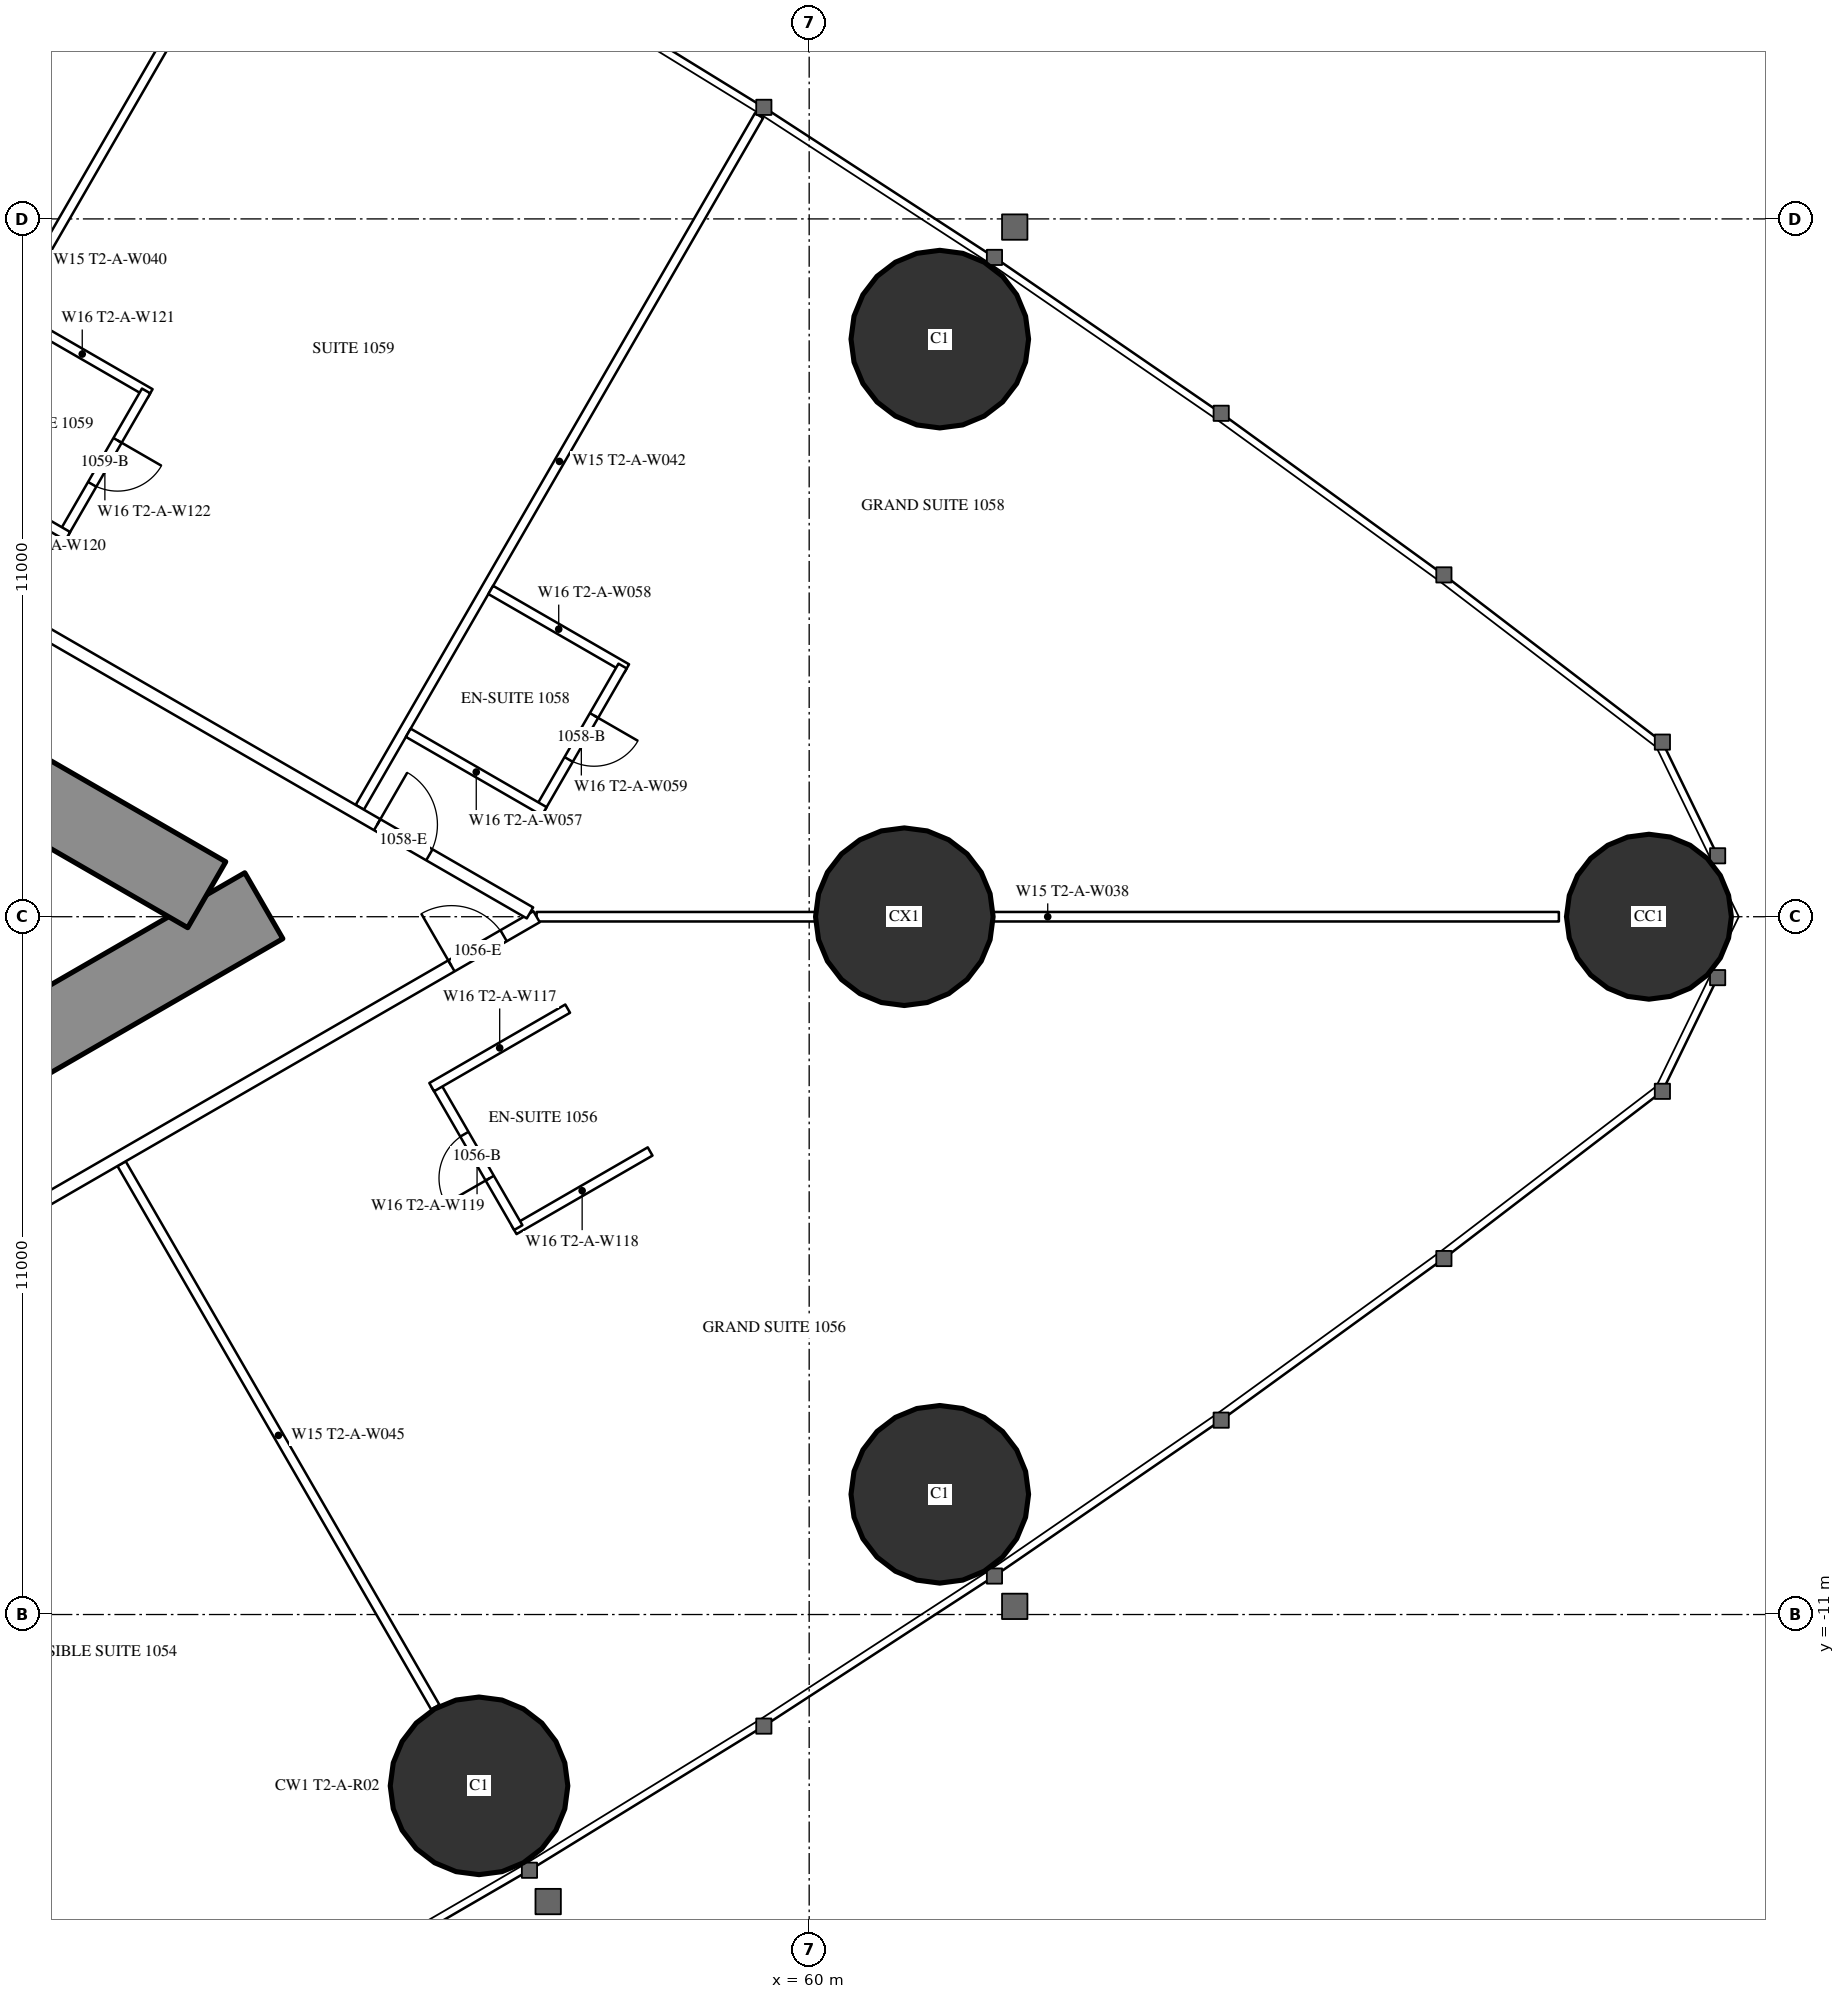
"""IFC4 building model, lengths in metres.
Left out: names, types, materials, properties, quantities, classifications, styles, units other than length and angle.
Written with IfcOpenShell. Run it as: python <this file> out.ifc"""

import sys

from ifc_helpers import new_model, si_unit, direction, frame, frame_2d, origin, origin_2d, place, context, subcontext, project, spatial, rectangle, hollow_circle, extrude, element, fill, save


model = new_model("IFC4")
c1 = context("Model", 3, precision=1e-05, world=origin(), true_north=direction((0.0, 1.0)))
c2 = subcontext(c1, "Body", "Model", "MODEL_VIEW")
j1 = project(units=[si_unit("LENGTHUNIT", "METRE"), si_unit("PLANEANGLEUNIT", "RADIAN")], contexts=[c1])
p1 = place(None, origin())
s1 = spatial("IfcSite", under=j1, at=p1, CompositionType="ELEMENT")
p2 = place(p1, origin())
s2 = spatial("IfcBuilding", under=s1, at=p2, CompositionType="ELEMENT")
p3 = place(p2, frame((0.0, 0.0, 42.5)))
s3 = spatial("IfcBuildingStorey", under=s2, at=p3, CompositionType="ELEMENT", Elevation=42.5)
p4 = place(p3, frame((73.239, 0.0, 0.0), z_axis=(0.0, 0.0, 1.0), x_axis=(1.0, 0.0, 0.0)))
e1 = element("IfcColumn", 1, at=p4, inside=s3, PredefinedType="COLUMN", context=c2, shape_type="SweptSolid", body=[
    extrude(hollow_circle(Radius=1.3, WallThickness=0.1, at=origin_2d()), origin(), (0.0, 0.0, 1.0), 3.5),
])
for number, where, z_axis, x_axis in (
    (2, (62.059, 9.105, 0.0), (0.0, 0.0, 1.0), (1.0, 0.0, 0.0)),
    (3, (54.795, -13.701, 0.0), (0.0, 0.0, 1.0), (1.0, 0.0, 0.0)),
    (4, (62.059, -9.105, 0.0), (0.0, 0.0, 1.0), (1.0, 0.0, 0.0)),
):
    element("IfcColumn", number, at=place(p3, frame(where, z_axis=z_axis, x_axis=x_axis)), inside=s3, PredefinedType="COLUMN", context=c2, shape_type="SweptSolid", body=[
        extrude(hollow_circle(Radius=1.4, WallThickness=0.12, at=origin_2d()), origin(), (0.0, 0.0, 1.0), 3.5),
    ])
p5 = place(p3, frame((61.5, 0.0, 0.0), z_axis=(0.0, 0.0, 1.0), x_axis=(1.0, 0.0, 0.0)))
e5 = element("IfcColumn", 5, at=p5, inside=s3, PredefinedType="COLUMN", context=c2, shape_type="SweptSolid", body=[
    extrude(hollow_circle(Radius=1.4, WallThickness=0.1, at=origin_2d()), origin(), (0.0, 0.0, 1.0), 3.5),
])
p6 = place(p3, frame((27.2, -13.8, 0.0), z_axis=(0.0, 0.0, 1.0), x_axis=(0.866027159892, 0.499996958321, 0.0)))
e6 = element("IfcWall", 6, at=p6, inside=s3, PredefinedType="SHEAR", context=c2, shape_type="SweptSolid", body=[
    extrude(rectangle(XDim=27.947, YDim=1.2, at=frame_2d((13.973, 0.0))), origin(), (0.0, 0.0, 1.0), 3.5),
])
p7 = place(p6, frame((4.6, 0.0, 0.0)))
e7 = element("IfcOpeningElement", 7, at=p7, cuts=e6, PredefinedType="OPENING", context=c2, shape_type="SweptSolid", body=[
    extrude(rectangle(XDim=1.0, YDim=2.2, at=frame_2d((0.5, 1.1))), frame((0.0, 0.61, 0.0), z_axis=(0.0, -1.0, 0.0), x_axis=(1.0, 0.0, 0.0)), (0.0, 0.0, 1.0), 1.22),
])
p8 = place(p6, frame((13.395, 0.0, 0.0)))
e8 = element("IfcOpeningElement", 8, at=p8, cuts=e6, PredefinedType="OPENING", context=c2, shape_type="SweptSolid", body=[
    extrude(rectangle(XDim=1.8, YDim=2.2, at=frame_2d((0.9, 1.1))), frame((0.0, 0.61, 0.0), z_axis=(0.0, -1.0, 0.0), x_axis=(1.0, 0.0, 0.0)), (0.0, 0.0, 1.0), 1.22),
])
p9 = place(p3, frame((27.2, 13.8, 0.0), z_axis=(0.0, 0.0, 1.0), x_axis=(0.866024515034, -0.500001539357, 0.0)))
e9 = element("IfcWall", 9, at=p9, inside=s3, PredefinedType="SHEAR", context=c2, shape_type="SweptSolid", body=[
    extrude(rectangle(XDim=26.907, YDim=1.2, at=frame_2d((13.454, 0.0))), origin(), (0.0, 0.0, 1.0), 3.5),
])
p10 = place(p9, frame((4.6, 0.0, 0.0)))
e10 = element("IfcOpeningElement", 10, at=p10, cuts=e9, PredefinedType="OPENING", context=c2, shape_type="SweptSolid", body=[
    extrude(rectangle(XDim=1.0, YDim=2.2, at=frame_2d((0.5, 1.1))), frame((0.0, 0.61, 0.0), z_axis=(0.0, -1.0, 0.0), x_axis=(1.0, 0.0, 0.0)), (0.0, 0.0, 1.0), 1.22),
])
p11 = place(p9, frame((13.395, 0.0, 0.0)))
e11 = element("IfcOpeningElement", 11, at=p11, cuts=e9, PredefinedType="OPENING", context=c2, shape_type="SweptSolid", body=[
    extrude(rectangle(XDim=1.8, YDim=2.2, at=frame_2d((0.9, 1.1))), frame((0.0, 0.61, 0.0), z_axis=(0.0, -1.0, 0.0), x_axis=(1.0, 0.0, 0.0)), (0.0, 0.0, 1.0), 1.22),
])
p12 = place(p3, frame((49.159, -3.893, 0.0), z_axis=(0.0, 0.0, 1.0), x_axis=(0.499998773722, -0.866026111775, 0.0)))
e12 = element("IfcWall", 12, at=p12, inside=s3, PredefinedType="PARTITIONING", context=c2, shape_type="SweptSolid", body=[
    extrude(rectangle(XDim=9.892, YDim=0.15, at=frame_2d((4.946, 0.0))), origin(), (0.0, 0.0, 1.0), 2.25),
])
p13 = place(p3, frame((45.403, 6.062, 0.0), z_axis=(0.0, 0.0, 1.0), x_axis=(0.500013434677, 0.866017647131, 0.0)))
e13 = element("IfcWall", 13, at=p13, inside=s3, PredefinedType="PARTITIONING", context=c2, shape_type="SweptSolid", body=[
    extrude(rectangle(XDim=9.902, YDim=0.15, at=frame_2d((4.951, 0.0))), origin(), (0.0, 0.0, 1.0), 2.25),
])
p14 = place(p3, frame((52.915, 1.725, 0.0), z_axis=(0.0, 0.0, 1.0), x_axis=(0.499997163113, 0.866027041656, 0.0)))
e14 = element("IfcWall", 14, at=p14, inside=s3, PredefinedType="PARTITIONING", context=c2, shape_type="SweptSolid", body=[
    extrude(rectangle(XDim=12.591, YDim=0.15, at=frame_2d((6.295, 0.0))), origin(), (0.0, 0.0, 1.0), 3.25),
])
p15 = place(p3, frame((55.702, 0.0, 0.0), z_axis=(0.0, 0.0, 1.0), x_axis=(1.0, 0.0, 0.0)))
e15 = element("IfcWall", 15, at=p15, inside=s3, PredefinedType="PARTITIONING", context=c2, shape_type="SweptSolid", body=[
    extrude(rectangle(XDim=16.117, YDim=0.15, at=frame_2d((8.059, 0.0))), origin(), (0.0, 0.0, 1.0), 2.25),
])
p16 = place(p3, frame((37.96, -10.243, 0.0), z_axis=(0.0, 0.0, 1.0), x_axis=(0.866026429433, 0.499998223521, 0.0)))
e16 = element("IfcWall", 16, at=p16, inside=s3, PredefinedType="PARTITIONING", context=c2, shape_type="SweptSolid", body=[
    extrude(rectangle(XDim=20.487, YDim=0.2, at=frame_2d((10.243, 0.0))), origin(), (0.0, 0.0, 1.0), 3.25),
])
p17 = place(p16, frame((7.325, 0.0, 0.0)))
e17 = element("IfcOpeningElement", 17, at=p17, cuts=e16, PredefinedType="OPENING", context=c2, shape_type="SweptSolid", body=[
    extrude(rectangle(XDim=1.0, YDim=2.2, at=frame_2d((0.5, 1.1))), frame((0.0, 0.11, 0.0), z_axis=(0.0, -1.0, 0.0), x_axis=(1.0, 0.0, 0.0)), (0.0, 0.0, 1.0), 0.22),
])
p18 = place(p16, frame((18.937, 0.0, 0.0)))
e18 = element("IfcOpeningElement", 18, at=p18, cuts=e16, PredefinedType="OPENING", context=c2, shape_type="SweptSolid", body=[
    extrude(rectangle(XDim=0.95, YDim=2.2, at=frame_2d((0.475, 1.1))), frame((0.0, 0.11, 0.0), z_axis=(0.0, -1.0, 0.0), x_axis=(1.0, 0.0, 0.0)), (0.0, 0.0, 1.0), 0.22),
])
p19 = place(p16, frame((0.6, 0.0, 0.0)))
e19 = element("IfcOpeningElement", 19, at=p19, cuts=e16, PredefinedType="OPENING", context=c2, shape_type="SweptSolid", body=[
    extrude(rectangle(XDim=0.95, YDim=2.2, at=frame_2d((0.475, 1.1))), frame((0.0, 0.11, 0.0), z_axis=(0.0, -1.0, 0.0), x_axis=(1.0, 0.0, 0.0)), (0.0, 0.0, 1.0), 0.22),
])
p20 = place(p3, frame((36.834, 10.894, 0.0), z_axis=(0.0, 0.0, 1.0), x_axis=(0.866028157229, -0.499995230863, 0.0)))
e20 = element("IfcWall", 20, at=p20, inside=s3, PredefinedType="PARTITIONING", context=c2, shape_type="SweptSolid", body=[
    extrude(rectangle(XDim=21.667, YDim=0.2, at=frame_2d((10.833, 0.0))), origin(), (0.0, 0.0, 1.0), 3.25),
])
p21 = place(p20, frame((18.885, 0.0, 0.0)))
e21 = element("IfcOpeningElement", 21, at=p21, cuts=e20, PredefinedType="OPENING", context=c2, shape_type="SweptSolid", body=[
    extrude(rectangle(XDim=0.95, YDim=2.2, at=frame_2d((0.475, 1.1))), frame((0.0, 0.11, 0.0), z_axis=(0.0, -1.0, 0.0), x_axis=(1.0, 0.0, 0.0)), (0.0, 0.0, 1.0), 0.22),
])
p22 = place(p20, frame((10.212, 0.0, 0.0)))
e22 = element("IfcOpeningElement", 22, at=p22, cuts=e20, PredefinedType="OPENING", context=c2, shape_type="SweptSolid", body=[
    extrude(rectangle(XDim=0.95, YDim=2.2, at=frame_2d((0.475, 1.1))), frame((0.0, 0.11, 0.0), z_axis=(0.0, -1.0, 0.0), x_axis=(1.0, 0.0, 0.0)), (0.0, 0.0, 1.0), 0.22),
])
p23 = place(p20, frame((8.225, 0.0, 0.0)))
e23 = element("IfcOpeningElement", 23, at=p23, cuts=e20, PredefinedType="OPENING", context=c2, shape_type="SweptSolid", body=[
    extrude(rectangle(XDim=0.95, YDim=2.2, at=frame_2d((0.475, 1.1))), frame((0.0, 0.11, 0.0), z_axis=(0.0, -1.0, 0.0), x_axis=(1.0, 0.0, 0.0)), (0.0, 0.0, 1.0), 0.22),
])
p24 = place(p20, frame((1.825, 0.0, 0.0)))
e24 = element("IfcOpeningElement", 24, at=p24, cuts=e20, PredefinedType="OPENING", context=c2, shape_type="SweptSolid", body=[
    extrude(rectangle(XDim=0.95, YDim=2.2, at=frame_2d((0.475, 1.1))), frame((0.0, 0.11, 0.0), z_axis=(0.0, -1.0, 0.0), x_axis=(1.0, 0.0, 0.0)), (0.0, 0.0, 1.0), 0.22),
])
p25 = place(p20, frame((0.246, 0.0, 0.0)))
e25 = element("IfcOpeningElement", 25, at=p25, cuts=e20, PredefinedType="OPENING", context=c2, shape_type="SweptSolid", body=[
    extrude(rectangle(XDim=0.9, YDim=2.2, at=frame_2d((0.45, 1.1))), frame((0.0, 0.11, 0.0), z_axis=(0.0, -1.0, 0.0), x_axis=(1.0, 0.0, 0.0)), (0.0, 0.0, 1.0), 0.22),
])
p26 = place(p3, frame((55.349, -4.938, 0.0), z_axis=(0.0, 0.0, 1.0), x_axis=(0.866006523861, 0.500032699561, 0.0)))
e26 = element("IfcWall", 26, at=p26, inside=s3, PredefinedType="PARTITIONING", context=c2, shape_type="SweptSolid", body=[
    extrude(rectangle(XDim=2.475, YDim=0.15, at=frame_2d((1.237, 0.0))), origin(), (0.0, 0.0, 1.0), 3.25),
])
p27 = place(p3, frame((54.114, -2.649, 0.0), z_axis=(0.0, 0.0, 1.0), x_axis=(0.500006934395, -0.866021400173, 0.0)))
e27 = element("IfcWall", 27, at=p27, inside=s3, PredefinedType="PARTITIONING", context=c2, shape_type="SweptSolid", body=[
    extrude(rectangle(XDim=2.6, YDim=0.15, at=frame_2d((1.3, 0.0))), origin(), (0.0, 0.0, 1.0), 3.25),
])
p28 = place(p27, frame((0.9, 0.0, 0.0)))
e28 = element("IfcOpeningElement", 28, at=p28, cuts=e27, PredefinedType="OPENING", context=c2, shape_type="SweptSolid", body=[
    extrude(rectangle(XDim=0.8, YDim=2.2, at=frame_2d((0.4, 1.1))), frame((0.0, 0.085, 0.0), z_axis=(0.0, -1.0, 0.0), x_axis=(1.0, 0.0, 0.0)), (0.0, 0.0, 1.0), 0.17),
])
for number, where, z_axis, x_axis in (
    (29, (54.049, -2.687, 0.0), (0.0, 0.0, 1.0), (0.866, 0.5, 0.0)),
    (30, (54.98, 5.151, 0.0), (0.0, 0.0, 1.0), (0.866, -0.5, 0.0)),
):
    element("IfcWall", number, at=place(p3, frame(where, z_axis=z_axis, x_axis=x_axis)), inside=s3, PredefinedType="PARTITIONING", context=c2, shape_type="SweptSolid", body=[
        extrude(rectangle(XDim=2.475, YDim=0.15, at=frame_2d((1.237, 0.0))), origin(), (0.0, 0.0, 1.0), 3.25),
    ])
p29 = place(p3, frame((55.758, 1.7, 0.0), z_axis=(0.0, 0.0, 1.0), x_axis=(0.500006934395, 0.866021400173, 0.0)))
e31 = element("IfcWall", 31, at=p29, inside=s3, PredefinedType="PARTITIONING", context=c2, shape_type="SweptSolid", body=[
    extrude(rectangle(XDim=2.6, YDim=0.15, at=frame_2d((1.3, 0.0))), origin(), (0.0, 0.0, 1.0), 3.25),
])
p30 = place(p29, frame((0.9, 0.0, 0.0)))
e32 = element("IfcOpeningElement", 32, at=p30, cuts=e31, PredefinedType="OPENING", context=c2, shape_type="SweptSolid", body=[
    extrude(rectangle(XDim=0.8, YDim=2.2, at=frame_2d((0.4, 1.1))), frame((0.0, 0.085, 0.0), z_axis=(0.0, -1.0, 0.0), x_axis=(1.0, 0.0, 0.0)), (0.0, 0.0, 1.0), 0.17),
])
for number, where, z_axis, x_axis in (
    (33, (53.68, 2.9, 0.0), (0.0, 0.0, 1.0), (0.866, -0.5, 0.0)),
    (34, (47.468, 9.488, 0.0), (0.0, 0.0, 1.0), (0.866, -0.5, 0.0)),
):
    element("IfcWall", number, at=place(p3, frame(where, z_axis=z_axis, x_axis=x_axis)), inside=s3, PredefinedType="PARTITIONING", context=c2, shape_type="SweptSolid", body=[
        extrude(rectangle(XDim=2.475, YDim=0.15, at=frame_2d((1.237, 0.0))), origin(), (0.0, 0.0, 1.0), 3.25),
    ])
p31 = place(p3, frame((48.246, 6.037, 0.0), z_axis=(0.0, 0.0, 1.0), x_axis=(0.500006934395, 0.866021400173, 0.0)))
e35 = element("IfcWall", 35, at=p31, inside=s3, PredefinedType="PARTITIONING", context=c2, shape_type="SweptSolid", body=[
    extrude(rectangle(XDim=2.6, YDim=0.15, at=frame_2d((1.3, 0.0))), origin(), (0.0, 0.0, 1.0), 3.25),
])
p32 = place(p31, frame((0.9, 0.0, 0.0)))
e36 = element("IfcOpeningElement", 36, at=p32, cuts=e35, PredefinedType="OPENING", context=c2, shape_type="SweptSolid", body=[
    extrude(rectangle(XDim=0.8, YDim=2.2, at=frame_2d((0.4, 1.1))), frame((0.0, 0.085, 0.0), z_axis=(0.0, -1.0, 0.0), x_axis=(1.0, 0.0, 0.0)), (0.0, 0.0, 1.0), 0.17),
])
p33 = place(p3, frame((46.168, 7.237, 0.0), z_axis=(0.0, 0.0, 1.0), x_axis=(0.866006523861, -0.500032699561, 0.0)))
e37 = element("IfcWall", 37, at=p33, inside=s3, PredefinedType="PARTITIONING", context=c2, shape_type="SweptSolid", body=[
    extrude(rectangle(XDim=2.475, YDim=0.15, at=frame_2d((1.237, 0.0))), origin(), (0.0, 0.0, 1.0), 3.25),
])
p34 = place(p28, origin())
e38 = element("IfcDoor", 38, at=p34, inside=s3, OperationType="SINGLE_SWING_RIGHT", PredefinedType="DOOR", context=c2, shape_type="SweptSolid", body=[
    extrude(rectangle(XDim=0.8, YDim=2.2, at=frame_2d((0.4, 1.1))), frame((0.0, 0.025, 0.0), z_axis=(0.0, -1.0, 0.0), x_axis=(1.0, 0.0, 0.0)), (0.0, 0.0, 1.0), 0.05),
])
fill(e28, e38)
p35 = place(p18, origin())
e39 = element("IfcDoor", 39, at=p35, inside=s3, OperationType="SINGLE_SWING_LEFT", PredefinedType="DOOR", context=c2, shape_type="SweptSolid", body=[
    extrude(rectangle(XDim=0.95, YDim=2.2, at=frame_2d((0.475, 1.1))), frame((0.0, 0.025, 0.0), z_axis=(0.0, -1.0, 0.0), x_axis=(1.0, 0.0, 0.0)), (0.0, 0.0, 1.0), 0.05),
])
fill(e18, e39)
p36 = place(p30, origin())
e40 = element("IfcDoor", 40, at=p36, inside=s3, OperationType="SINGLE_SWING_RIGHT", PredefinedType="DOOR", context=c2, shape_type="SweptSolid", body=[
    extrude(rectangle(XDim=0.8, YDim=2.2, at=frame_2d((0.4, 1.1))), frame((0.0, 0.025, 0.0), z_axis=(0.0, -1.0, 0.0), x_axis=(1.0, 0.0, 0.0)), (0.0, 0.0, 1.0), 0.05),
])
fill(e32, e40)
p37 = place(p21, origin())
e41 = element("IfcDoor", 41, at=p37, inside=s3, OperationType="SINGLE_SWING_LEFT", PredefinedType="DOOR", context=c2, shape_type="SweptSolid", body=[
    extrude(rectangle(XDim=0.95, YDim=2.2, at=frame_2d((0.475, 1.1))), frame((0.0, 0.025, 0.0), z_axis=(0.0, -1.0, 0.0), x_axis=(1.0, 0.0, 0.0)), (0.0, 0.0, 1.0), 0.05),
])
fill(e21, e41)
p38 = place(p32, origin())
e42 = element("IfcDoor", 42, at=p38, inside=s3, OperationType="SINGLE_SWING_RIGHT", PredefinedType="DOOR", context=c2, shape_type="SweptSolid", body=[
    extrude(rectangle(XDim=0.8, YDim=2.2, at=frame_2d((0.4, 1.1))), frame((0.0, 0.025, 0.0), z_axis=(0.0, -1.0, 0.0), x_axis=(1.0, 0.0, 0.0)), (0.0, 0.0, 1.0), 0.05),
])
fill(e36, e42)
save(model, sys.argv[1])
